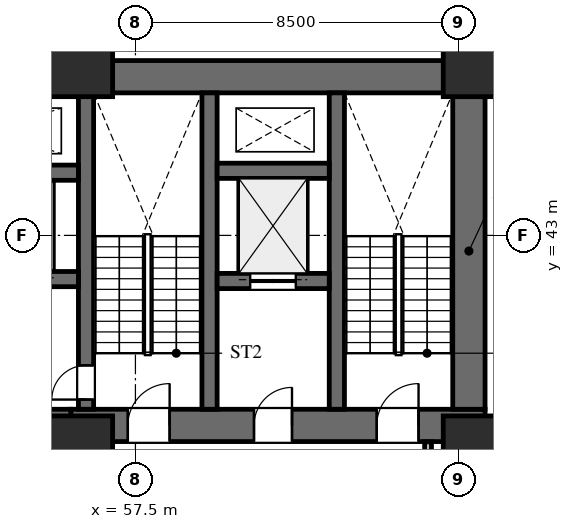
"""IFC4 building model, lengths in metres.
Left out: names, types, materials, properties, quantities, classifications, styles, units other than length and angle.
Written with IfcOpenShell. Run it as: python <this file> out.ifc"""

import sys

from ifc_helpers import new_model, si_unit, direction, frame, frame_2d, origin, origin_2d, place, context, subcontext, project, spatial, rectangle, extrude, element, fill, save


model = new_model("IFC4")
c1 = context("Model", 3, precision=1e-05, world=origin(), true_north=direction((0.0, 1.0)))
c2 = subcontext(c1, "Body", "Model", "MODEL_VIEW")
j1 = project(units=[si_unit("LENGTHUNIT", "METRE"), si_unit("PLANEANGLEUNIT", "RADIAN")], contexts=[c1])
p1 = place(None, origin())
s1 = spatial("IfcSite", under=j1, at=p1, CompositionType="ELEMENT")
p2 = place(p1, origin())
s2 = spatial("IfcBuilding", under=s1, at=p2, CompositionType="ELEMENT")
p3 = place(p2, frame((0.0, 0.0, -4.2)))
s3 = spatial("IfcBuildingStorey", under=s2, at=p3, CompositionType="ELEMENT", Elevation=-4.2)
p4 = place(p3, frame((22.9, 47.175, 0.0), z_axis=(0.0, 0.0, 1.0), x_axis=(1.0, 0.0, 0.0)))
e1 = element("IfcWall", 1, at=p4, inside=s3, PredefinedType="SHEAR", context=c2, shape_type="SweptSolid", body=[
    extrude(rectangle(XDim=43.8, YDim=0.85, at=frame_2d((21.9, 0.0))), origin(), (0.0, 0.0, 1.0), 4.2),
])
p5 = place(p3, frame((55.8, 38.0, 0.0), z_axis=(0.0, 0.0, 1.0), x_axis=(1.0, 0.0, 0.0)))
e2 = element("IfcWall", 2, at=p5, inside=s3, PredefinedType="SHEAR", context=c2, shape_type="SweptSolid", body=[
    extrude(rectangle(XDim=10.9, YDim=0.85, at=frame_2d((5.45, 0.0))), origin(), (0.0, 0.0, 1.0), 4.2),
])
p6 = place(p5, frame((1.5, 0.0, 0.0)))
e3 = element("IfcOpeningElement", 3, at=p6, cuts=e2, PredefinedType="OPENING", context=c2, shape_type="SweptSolid", body=[
    extrude(rectangle(XDim=1.1, YDim=2.2, at=frame_2d((0.55, 1.1))), frame((0.0, 0.435, 0.0), z_axis=(0.0, -1.0, 0.0), x_axis=(1.0, 0.0, 0.0)), (0.0, 0.0, 1.0), 0.87),
])
p7 = place(p5, frame((4.82, 0.0, 0.0)))
e4 = element("IfcOpeningElement", 4, at=p7, cuts=e2, PredefinedType="OPENING", context=c2, shape_type="SweptSolid", body=[
    extrude(rectangle(XDim=1.0, YDim=2.15, at=frame_2d((0.5, 1.075))), frame((0.0, 0.435, 0.0), z_axis=(0.0, -1.0, 0.0), x_axis=(1.0, 0.0, 0.0)), (0.0, 0.0, 1.0), 0.87),
])
p8 = place(p5, frame((8.05, 0.0, 0.0)))
e5 = element("IfcOpeningElement", 5, at=p8, cuts=e2, PredefinedType="OPENING", context=c2, shape_type="SweptSolid", body=[
    extrude(rectangle(XDim=1.1, YDim=2.2, at=frame_2d((0.55, 1.1))), frame((0.0, 0.435, 0.0), z_axis=(0.0, -1.0, 0.0), x_axis=(1.0, 0.0, 0.0)), (0.0, 0.0, 1.0), 0.87),
])
p9 = place(p3, frame((66.275, 38.425, 0.0), z_axis=(0.0, 0.0, 1.0), x_axis=(0.0, 1.0, 0.0)))
e6 = element("IfcWall", 6, at=p9, inside=s3, PredefinedType="SHEAR", context=c2, shape_type="SweptSolid", body=[
    extrude(rectangle(XDim=8.325, YDim=0.85, at=frame_2d((4.163, 0.0))), origin(), (0.0, 0.0, 1.0), 4.2),
])
for number, where, z_axis, x_axis in (
    (7, (62.8, 38.425, 0.0), (0.0, 0.0, 1.0), (0.0, 1.0, 0.0)),
    (8, (59.45, 38.425, 0.0), (0.0, 0.0, 1.0), (0.0, 1.0, 0.0)),
):
    element("IfcWall", number, at=place(p3, frame(where, z_axis=z_axis, x_axis=x_axis)), inside=s3, PredefinedType="SHEAR", context=c2, shape_type="SweptSolid", body=[
        extrude(rectangle(XDim=8.325, YDim=0.4, at=frame_2d((4.163, 0.0))), origin(), (0.0, 0.0, 1.0), 4.2),
    ])
p10 = place(p3, frame((56.2, 38.425, 0.0), z_axis=(0.0, 0.0, 1.0), x_axis=(0.0, 1.0, 0.0)))
e9 = element("IfcWall", 9, at=p10, inside=s3, PredefinedType="SHEAR", context=c2, shape_type="SweptSolid", body=[
    extrude(rectangle(XDim=8.325, YDim=0.4, at=frame_2d((4.163, 0.0))), origin(), (0.0, 0.0, 1.0), 4.2),
])
p11 = place(p10, frame((0.255, 0.0, 0.0)))
e10 = element("IfcOpeningElement", 10, at=p11, cuts=e9, PredefinedType="OPENING", context=c2, shape_type="SweptSolid", body=[
    extrude(rectangle(XDim=0.9, YDim=2.15, at=frame_2d((0.45, 1.075))), frame((0.0, 0.21, 0.0), z_axis=(0.0, -1.0, 0.0), x_axis=(1.0, 0.0, 0.0)), (0.0, 0.0, 1.0), 0.42),
])
p12 = place(p3, frame((59.65, 41.8, 0.0), z_axis=(0.0, 0.0, 1.0), x_axis=(1.0, 0.0, 0.0)))
e11 = element("IfcWall", 11, at=p12, inside=s3, PredefinedType="SHEAR", context=c2, shape_type="SweptSolid", body=[
    extrude(rectangle(XDim=2.95, YDim=0.4, at=frame_2d((1.475, 0.0))), origin(), (0.0, 0.0, 1.0), 4.2),
])
p13 = place(p12, frame((0.87, 0.0, 0.0)))
e12 = element("IfcOpeningElement", 12, at=p13, cuts=e11, PredefinedType="OPENING", context=c2, shape_type="SweptSolid", body=[
    extrude(rectangle(XDim=1.2, YDim=2.2, at=frame_2d((0.6, 1.1))), frame((0.0, 0.21, 0.0), z_axis=(0.0, -1.0, 0.0), x_axis=(1.0, 0.0, 0.0)), (0.0, 0.0, 1.0), 0.42),
])
p14 = place(p3, frame((59.65, 44.7, 0.0), z_axis=(0.0, 0.0, 1.0), x_axis=(1.0, 0.0, 0.0)))
e13 = element("IfcWall", 13, at=p14, inside=s3, PredefinedType="SHEAR", context=c2, shape_type="SweptSolid", body=[
    extrude(rectangle(XDim=2.95, YDim=0.4, at=frame_2d((1.475, 0.0))), origin(), (0.0, 0.0, 1.0), 4.2),
])
p15 = place(p3, frame((50.8, 38.0, 0.0), z_axis=(0.0, 0.0, 1.0), x_axis=(1.0, 0.0, 0.0)))
e14 = element("IfcWall", 14, at=p15, inside=s3, PredefinedType="SHEAR", context=c2, shape_type="SweptSolid", body=[
    extrude(rectangle(XDim=5.0, YDim=0.85, at=frame_2d((2.5, 0.0))), origin(), (0.0, 0.0, 1.0), 4.2),
])
p16 = place(p15, frame((2.0, 0.0, 0.0)))
e15 = element("IfcOpeningElement", 15, at=p16, cuts=e14, PredefinedType="OPENING", context=c2, shape_type="SweptSolid", body=[
    extrude(rectangle(XDim=1.2, YDim=2.2, at=frame_2d((0.6, 1.1))), frame((0.0, 0.435, 0.0), z_axis=(0.0, -1.0, 0.0), x_axis=(1.0, 0.0, 0.0)), (0.0, 0.0, 1.0), 0.87),
])
p17 = place(p3, frame((51.25, 41.85, 0.0), z_axis=(0.0, 0.0, 1.0), x_axis=(1.0, 0.0, 0.0)))
e16 = element("IfcWall", 16, at=p17, inside=s3, PredefinedType="SHEAR", context=c2, shape_type="SweptSolid", body=[
    extrude(rectangle(XDim=4.75, YDim=0.4, at=frame_2d((2.375, 0.0))), origin(), (0.0, 0.0, 1.0), 4.2),
])
p18 = place(p17, frame((0.5, 0.0, 0.0)))
e17 = element("IfcOpeningElement", 17, at=p18, cuts=e16, PredefinedType="OPENING", context=c2, shape_type="SweptSolid", body=[
    extrude(rectangle(XDim=1.2, YDim=2.2, at=frame_2d((0.6, 1.1))), frame((0.0, 0.21, 0.0), z_axis=(0.0, -1.0, 0.0), x_axis=(1.0, 0.0, 0.0)), (0.0, 0.0, 1.0), 0.42),
])
p19 = place(p17, frame((2.6, 0.0, 0.0)))
e18 = element("IfcOpeningElement", 18, at=p19, cuts=e16, PredefinedType="OPENING", context=c2, shape_type="SweptSolid", body=[
    extrude(rectangle(XDim=1.2, YDim=2.2, at=frame_2d((0.6, 1.1))), frame((0.0, 0.21, 0.0), z_axis=(0.0, -1.0, 0.0), x_axis=(1.0, 0.0, 0.0)), (0.0, 0.0, 1.0), 0.42),
])
p20 = place(p3, frame((51.25, 44.65, 0.0), z_axis=(0.0, 0.0, 1.0), x_axis=(1.0, 0.0, 0.0)))
e19 = element("IfcWall", 19, at=p20, inside=s3, PredefinedType="SHEAR", context=c2, shape_type="SweptSolid", body=[
    extrude(rectangle(XDim=4.75, YDim=0.4, at=frame_2d((2.375, 0.0))), origin(), (0.0, 0.0, 1.0), 4.2),
])
for number, where, z_axis, x_axis in (
    (20, (66.5, 47.55, 0.0), (0.0, 0.0, 1.0), (1.0, 0.0, 0.0)),
    (21, (56.0, 47.55, 0.0), (0.0, 0.0, 1.0), (1.0, 0.0, 0.0)),
    (22, (66.5, 37.35, 0.0), (0.0, 0.0, 1.0), (1.0, 0.0, 0.0)),
    (23, (56.0, 37.35, 0.0), (0.0, 0.0, 1.0), (1.0, 0.0, 0.0)),
):
    element("IfcColumn", number, at=place(p3, frame(where, z_axis=z_axis, x_axis=x_axis)), inside=s3, PredefinedType="COLUMN", context=c2, shape_type="SweptSolid", body=[
        extrude(rectangle(XDim=1.8, YDim=1.8, at=origin_2d()), origin(), (0.0, 0.0, 1.0), 4.2),
    ])
p21 = place(p3, frame((65.2, 34.4, 0.0), z_axis=(0.0, 0.0, 1.0), x_axis=(0.0, 1.0, 0.0)))
e24 = element("IfcWall", 24, at=p21, inside=s3, PredefinedType="STANDARD", context=c2, shape_type="SweptSolid", body=[
    extrude(rectangle(XDim=3.167, YDim=0.18, at=frame_2d((1.583, 0.0))), origin(), (0.0, 0.0, 1.0), 2.902),
])
p22 = place(p6, origin())
e25 = element("IfcDoor", 25, at=p22, inside=s3, OperationType="SINGLE_SWING_RIGHT", PredefinedType="DOOR", context=c2, shape_type="SweptSolid", body=[
    extrude(rectangle(XDim=1.1, YDim=2.2, at=frame_2d((0.55, 1.1))), frame((0.0, 0.025, 0.0), z_axis=(0.0, -1.0, 0.0), x_axis=(1.0, 0.0, 0.0)), (0.0, 0.0, 1.0), 0.05),
])
fill(e3, e25)
p23 = place(p7, origin())
e26 = element("IfcDoor", 26, at=p23, inside=s3, OperationType="SINGLE_SWING_RIGHT", PredefinedType="DOOR", context=c2, shape_type="SweptSolid", body=[
    extrude(rectangle(XDim=1.0, YDim=2.15, at=frame_2d((0.5, 1.075))), frame((0.0, 0.025, 0.0), z_axis=(0.0, -1.0, 0.0), x_axis=(1.0, 0.0, 0.0)), (0.0, 0.0, 1.0), 0.05),
])
fill(e4, e26)
p24 = place(p8, origin())
e27 = element("IfcDoor", 27, at=p24, inside=s3, OperationType="SINGLE_SWING_RIGHT", PredefinedType="DOOR", context=c2, shape_type="SweptSolid", body=[
    extrude(rectangle(XDim=1.1, YDim=2.2, at=frame_2d((0.55, 1.1))), frame((0.0, 0.025, 0.0), z_axis=(0.0, -1.0, 0.0), x_axis=(1.0, 0.0, 0.0)), (0.0, 0.0, 1.0), 0.05),
])
fill(e5, e27)
p25 = place(p11, origin())
e28 = element("IfcDoor", 28, at=p25, inside=s3, OperationType="SINGLE_SWING_LEFT", PredefinedType="DOOR", context=c2, shape_type="SweptSolid", body=[
    extrude(rectangle(XDim=0.9, YDim=2.15, at=frame_2d((0.45, 1.075))), frame((0.0, 0.025, 0.0), z_axis=(0.0, -1.0, 0.0), x_axis=(1.0, 0.0, 0.0)), (0.0, 0.0, 1.0), 0.05),
])
fill(e10, e28)
p26 = place(p13, origin())
e29 = element("IfcDoor", 29, at=p26, inside=s3, OperationType="DOUBLE_DOOR_SLIDING", PredefinedType="DOOR", context=c2, shape_type="SweptSolid", body=[
    extrude(rectangle(XDim=1.2, YDim=2.2, at=frame_2d((0.6, 1.1))), frame((0.0, 0.025, 0.0), z_axis=(0.0, -1.0, 0.0), x_axis=(1.0, 0.0, 0.0)), (0.0, 0.0, 1.0), 0.05),
])
fill(e12, e29)
save(model, sys.argv[1])
